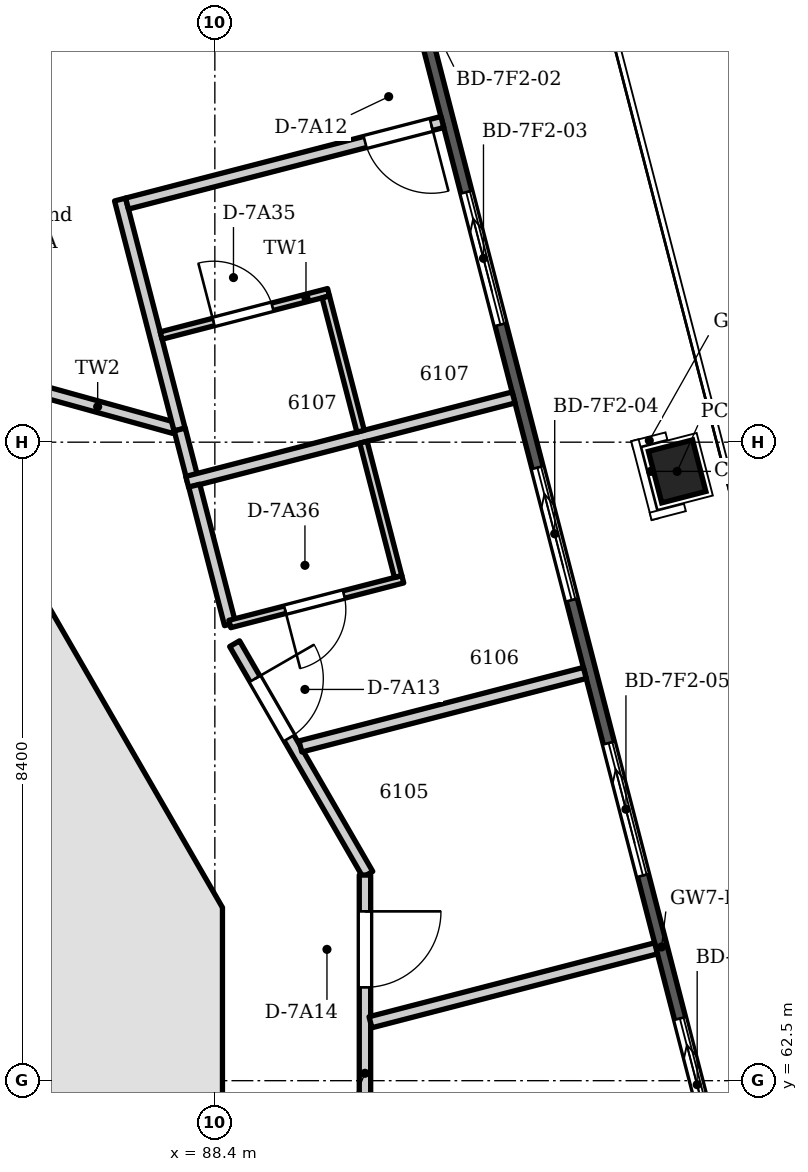
"""IFC4 building model, lengths in metres.
Left out: names, types, materials, properties, quantities, classifications, styles, units other than length and angle.
Written with IfcOpenShell. Run it as: python <this file> out.ifc"""

import sys

from ifc_helpers import new_model, si_unit, direction, frame, frame_2d, origin, origin_2d, place, context, subcontext, project, spatial, polyline, rectangle, outline, extrude, element, fill, save


model = new_model("IFC4")
c1 = context("Model", 3, precision=1e-05, world=origin(), true_north=direction((0.0, 1.0)))
c2 = subcontext(c1, "Body", "Model", "MODEL_VIEW")
j1 = project(units=[si_unit("LENGTHUNIT", "METRE"), si_unit("PLANEANGLEUNIT", "RADIAN")], contexts=[c1])
p1 = place(None, origin())
s1 = spatial("IfcSite", under=j1, at=p1, CompositionType="ELEMENT")
p2 = place(p1, origin())
s2 = spatial("IfcBuilding", under=s1, at=p2, CompositionType="ELEMENT")
p3 = place(p2, frame((0.0, 0.0, 234.9)))
s3 = spatial("IfcBuildingStorey", under=s2, at=p3, CompositionType="ELEMENT", Elevation=234.9)
p4 = place(p3, frame((88.15, 60.222, 0.0), z_axis=(0.0, 0.0, 1.0), x_axis=(0.0, 1.0, 0.0)))
e1 = element("IfcWall", 1, at=p4, inside=s3, PredefinedType="SHEAR", context=c2, shape_type="SweptSolid", body=[
    extrude(outline(polyline([(0.0, -0.35), (4.555, -0.35), (4.368, 0.35), (0.188, 0.35), (0.0, -0.35)])), origin(), (0.0, 0.0, 1.0), 3.6),
])
p5 = place(p4, frame((0.642, 0.0, 0.0)))
e2 = element("IfcOpeningElement", 2, at=p5, cuts=e1, PredefinedType="OPENING", context=c2, shape_type="SweptSolid", body=[
    extrude(rectangle(XDim=0.9, YDim=2.1, at=frame_2d((0.45, 1.05))), frame((0.0, 0.36, 0.0), z_axis=(0.0, -1.0, 0.0), x_axis=(1.0, 0.0, 0.0)), (0.0, 0.0, 1.0), 0.72),
])
p6 = place(p3, frame((88.197, 64.603, 0.0), z_axis=(0.0, 0.0, 1.0), x_axis=(-0.499983800959, 0.866034756103, 0.0)))
e3 = element("IfcWall", 3, at=p6, inside=s3, PredefinedType="SHEAR", context=c2, shape_type="SweptSolid", body=[
    extrude(outline(polyline([(0.0, -0.35), (4.555, -0.35), (4.368, 0.35), (0.188, 0.35), (0.0, -0.35)])), origin(), (0.0, 0.0, 1.0), 3.6),
])
p7 = place(p6, frame((1.677, 0.0, 0.0)))
e4 = element("IfcOpeningElement", 4, at=p7, cuts=e3, PredefinedType="OPENING", context=c2, shape_type="SweptSolid", body=[
    extrude(rectangle(XDim=1.2, YDim=2.1, at=frame_2d((0.6, 1.05))), frame((0.0, 0.36, 0.0), z_axis=(0.0, -1.0, 0.0), x_axis=(1.0, 0.0, 0.0)), (0.0, 0.0, 1.0), 0.72),
])
p8 = place(p3, frame((83.619, 63.031, 0.0), z_axis=(0.0, 0.0, 1.0), x_axis=(0.866059941101, 0.499940174841, 0.0)))
e5 = element("IfcWall", 5, at=p8, inside=s3, PredefinedType="SHEAR", context=c2, shape_type="SweptSolid", body=[
    extrude(rectangle(XDim=4.4, YDim=0.3, at=frame_2d((2.2, 0.0))), origin(), (0.0, 0.0, 1.0), 3.6),
])
p9 = place(p8, frame((1.4, 0.0, 0.0)))
e6 = element("IfcOpeningElement", 6, at=p9, cuts=e5, PredefinedType="OPENING", context=c2, shape_type="SweptSolid", body=[
    extrude(rectangle(XDim=0.9, YDim=2.1, at=frame_2d((0.45, 1.05))), frame((0.0, 0.16, 0.0), z_axis=(0.0, -1.0, 0.0), x_axis=(1.0, 0.0, 0.0)), (0.0, 0.0, 1.0), 0.32),
])
p10 = place(p3, frame((81.8, 63.28, 0.0), z_axis=(0.0, 0.0, 1.0), x_axis=(0.866009627307, -0.500027324665, 0.0)))
e7 = element("IfcWall", 7, at=p10, inside=s3, PredefinedType="SHEAR", context=c2, shape_type="SweptSolid", body=[
    extrude(rectangle(XDim=6.632, YDim=0.3, at=frame_2d((3.316, 0.0))), origin(), (0.0, 0.0, 1.0), 3.6),
])
p11 = place(p3, frame((94.482, 70.516, -0.35), z_axis=(0.0, 0.0, 1.0), x_axis=(-0.250380004054, 0.968147640378, 0.0)))
e8 = element("IfcColumn", 8, at=p11, inside=s3, PredefinedType="COLUMN", context=c2, shape_type="SweptSolid", body=[
    extrude(rectangle(XDim=0.7, YDim=0.6, at=origin_2d()), origin(), (0.0, 0.0, 1.0), 3.95),
])
p12 = place(p3, frame((89.591, 82.378, 0.0), z_axis=(0.0, 0.0, 1.0), x_axis=(0.250378839788, -0.968147941477, 0.0)))
e9 = element("IfcWall", 9, at=p12, inside=s3, PredefinedType="SOLIDWALL", context=c2, shape_type="SweptSolid", body=[
    extrude(outline(polyline([(0.149, 0.075), (0.149, -0.075), (33.537, -0.075), (33.537, 0.075), (0.149, 0.075)])), origin(), (0.0, 0.0, 1.0), 3.3),
])
p13 = place(p12, frame((1.171, 0.0, 0.0)))
e10 = element("IfcOpeningElement", 10, at=p13, cuts=e9, PredefinedType="OPENING", context=c2, shape_type="SweptSolid", body=[
    extrude(rectangle(XDim=1.8, YDim=2.6, at=frame_2d((0.9, 1.3))), frame((0.0, 0.085, 0.0), z_axis=(0.0, -1.0, 0.0), x_axis=(1.0, 0.0, 0.0)), (0.0, 0.0, 1.0), 0.17),
])
p14 = place(p12, frame((4.714, 0.0, 0.0)))
e11 = element("IfcOpeningElement", 11, at=p14, cuts=e9, PredefinedType="OPENING", context=c2, shape_type="SweptSolid", body=[
    extrude(rectangle(XDim=1.8, YDim=2.6, at=frame_2d((0.9, 1.3))), frame((0.0, 0.085, 0.0), z_axis=(0.0, -1.0, 0.0), x_axis=(1.0, 0.0, 0.0)), (0.0, 0.0, 1.0), 0.17),
])
p15 = place(p12, frame((8.457, 0.0, 0.0)))
e12 = element("IfcOpeningElement", 12, at=p15, cuts=e9, PredefinedType="OPENING", context=c2, shape_type="SweptSolid", body=[
    extrude(rectangle(XDim=1.8, YDim=2.6, at=frame_2d((0.9, 1.3))), frame((0.0, 0.085, 0.0), z_axis=(0.0, -1.0, 0.0), x_axis=(1.0, 0.0, 0.0)), (0.0, 0.0, 1.0), 0.17),
])
p16 = place(p12, frame((12.2, 0.0, 0.0)))
e13 = element("IfcOpeningElement", 13, at=p16, cuts=e9, PredefinedType="OPENING", context=c2, shape_type="SweptSolid", body=[
    extrude(rectangle(XDim=1.8, YDim=2.6, at=frame_2d((0.9, 1.3))), frame((0.0, 0.085, 0.0), z_axis=(0.0, -1.0, 0.0), x_axis=(1.0, 0.0, 0.0)), (0.0, 0.0, 1.0), 0.17),
])
p17 = place(p12, frame((15.943, 0.0, 0.0)))
e14 = element("IfcOpeningElement", 14, at=p17, cuts=e9, PredefinedType="OPENING", context=c2, shape_type="SweptSolid", body=[
    extrude(rectangle(XDim=1.8, YDim=2.6, at=frame_2d((0.9, 1.3))), frame((0.0, 0.085, 0.0), z_axis=(0.0, -1.0, 0.0), x_axis=(1.0, 0.0, 0.0)), (0.0, 0.0, 1.0), 0.17),
])
p18 = place(p12, frame((19.686, 0.0, 0.0)))
e15 = element("IfcOpeningElement", 15, at=p18, cuts=e9, PredefinedType="OPENING", context=c2, shape_type="SweptSolid", body=[
    extrude(rectangle(XDim=1.8, YDim=2.6, at=frame_2d((0.9, 1.3))), frame((0.0, 0.085, 0.0), z_axis=(0.0, -1.0, 0.0), x_axis=(1.0, 0.0, 0.0)), (0.0, 0.0, 1.0), 0.17),
])
p19 = place(p12, frame((23.429, 0.0, 0.0)))
e16 = element("IfcOpeningElement", 16, at=p19, cuts=e9, PredefinedType="OPENING", context=c2, shape_type="SweptSolid", body=[
    extrude(rectangle(XDim=1.8, YDim=2.6, at=frame_2d((0.9, 1.3))), frame((0.0, 0.085, 0.0), z_axis=(0.0, -1.0, 0.0), x_axis=(1.0, 0.0, 0.0)), (0.0, 0.0, 1.0), 0.17),
])
p20 = place(p12, frame((27.172, 0.0, 0.0)))
e17 = element("IfcOpeningElement", 17, at=p20, cuts=e9, PredefinedType="OPENING", context=c2, shape_type="SweptSolid", body=[
    extrude(rectangle(XDim=1.8, YDim=2.6, at=frame_2d((0.9, 1.3))), frame((0.0, 0.085, 0.0), z_axis=(0.0, -1.0, 0.0), x_axis=(1.0, 0.0, 0.0)), (0.0, 0.0, 1.0), 0.17),
])
p21 = place(p12, frame((30.715, 0.0, 0.0)))
e18 = element("IfcOpeningElement", 18, at=p21, cuts=e9, PredefinedType="OPENING", context=c2, shape_type="SweptSolid", body=[
    extrude(rectangle(XDim=1.8, YDim=2.6, at=frame_2d((0.9, 1.3))), frame((0.0, 0.085, 0.0), z_axis=(0.0, -1.0, 0.0), x_axis=(1.0, 0.0, 0.0)), (0.0, 0.0, 1.0), 0.17),
])
p22 = place(p3, origin())
e19 = element("IfcWall", 19, at=p22, inside=s3, PredefinedType="PARAPET", context=c2, shape_type="SweptSolid", body=[
    extrude(outline(polyline([(100.299, 50.419), (94.431, 89.683), (94.16, 89.468), (99.581, 53.198), (100.299, 50.419)])), origin(), (0.0, 0.0, 1.0), 1.1),
])
p23 = place(p3, frame((85.852, 71.646, 0.0), z_axis=(0.0, 0.0, 1.0), x_axis=(0.963638385721, -0.267209770713, 0.0)))
e20 = element("IfcWall", 20, at=p23, inside=s3, PredefinedType="PARTITIONING", context=c2, shape_type="SweptSolid", body=[
    extrude(rectangle(XDim=2.089, YDim=0.15, at=frame_2d((1.044, 0.0))), origin(), (0.0, 0.0, 1.0), 3.3),
])
p24 = place(p3, frame((87.153, 74.093, 0.0), z_axis=(0.0, 0.0, 1.0), x_axis=(0.250373987534, -0.968149196336, 0.0)))
e21 = element("IfcWall", 21, at=p24, inside=s3, PredefinedType="PARTITIONING", context=c2, shape_type="SweptSolid", body=[
    extrude(rectangle(XDim=3.126, YDim=0.15, at=frame_2d((1.563, 0.0))), origin(), (0.0, 0.0, 1.0), 3.3),
])
p25 = place(p3, frame((87.245, 74.039, 0.0), z_axis=(0.0, 0.0, 1.0), x_axis=(0.968129527106, 0.250450032434, 0.0)))
e22 = element("IfcWall", 22, at=p25, inside=s3, PredefinedType="PARTITIONING", context=c2, shape_type="SweptSolid", body=[
    extrude(rectangle(XDim=4.285, YDim=0.15, at=frame_2d((2.143, 0.0))), origin(), (0.0, 0.0, 1.0), 3.3),
])
p26 = place(p25, frame((3.235, 0.0, 0.0)))
e23 = element("IfcOpeningElement", 23, at=p26, cuts=e22, PredefinedType="OPENING", context=c2, shape_type="SweptSolid", body=[
    extrude(rectangle(XDim=0.9, YDim=2.1, at=frame_2d((0.45, 1.05))), frame((0.0, 0.085, 0.0), z_axis=(0.0, -1.0, 0.0), x_axis=(1.0, 0.0, 0.0)), (0.0, 0.0, 1.0), 0.17),
])
p27 = place(p3, frame((87.694, 72.303, 0.0), z_axis=(0.0, 0.0, 1.0), x_axis=(0.968107869502, 0.25053373627, 0.0)))
e24 = element("IfcWall", 24, at=p27, inside=s3, PredefinedType="PARTITIONING", context=c2, shape_type="SweptSolid", body=[
    extrude(rectangle(XDim=2.274, YDim=0.1, at=frame_2d((1.137, 0.0))), origin(), (0.0, 0.0, 1.0), 3.3),
])
p28 = place(p27, frame((0.712, 0.0, 0.0)))
e25 = element("IfcOpeningElement", 25, at=p28, cuts=e24, PredefinedType="OPENING", context=c2, shape_type="SweptSolid", body=[
    extrude(rectangle(XDim=0.8, YDim=2.1, at=frame_2d((0.4, 1.05))), frame((0.0, 0.06, 0.0), z_axis=(0.0, -1.0, 0.0), x_axis=(1.0, 0.0, 0.0)), (0.0, 0.0, 1.0), 0.12),
])
p29 = place(p3, frame((87.938, 71.067, 0.0), z_axis=(0.0, 0.0, 1.0), x_axis=(0.250122032582, -0.968214319672, 0.0)))
e26 = element("IfcWall", 26, at=p29, inside=s3, PredefinedType="PARTITIONING", context=c2, shape_type="SweptSolid", body=[
    extrude(rectangle(XDim=0.696, YDim=0.15, at=frame_2d((0.348, 0.0))), origin(), (0.0, 0.0, 1.0), 3.3),
])
p30 = place(p3, frame((88.036, 70.377, 0.0), z_axis=(0.0, 0.0, 1.0), x_axis=(0.968128504483, 0.25045398541, 0.0)))
e27 = element("IfcWall", 27, at=p30, inside=s3, PredefinedType="PARTITIONING", context=c2, shape_type="SweptSolid", body=[
    extrude(rectangle(XDim=4.435, YDim=0.15, at=frame_2d((2.218, 0.0))), origin(), (0.0, 0.0, 1.0), 3.3),
])
p31 = place(p3, frame((88.129, 70.328, 0.0), z_axis=(0.0, 0.0, 1.0), x_axis=(0.250183804331, -0.968198359868, 0.0)))
e28 = element("IfcWall", 28, at=p31, inside=s3, PredefinedType="PARTITIONING", context=c2, shape_type="SweptSolid", body=[
    extrude(rectangle(XDim=1.883, YDim=0.15, at=frame_2d((0.942, 0.0))), origin(), (0.0, 0.0, 1.0), 3.3),
])
p32 = place(p3, frame((88.597, 68.508, 0.0), z_axis=(0.0, 0.0, 1.0), x_axis=(0.968155594174, 0.250349246991, 0.0)))
e29 = element("IfcWall", 29, at=p32, inside=s3, PredefinedType="PARTITIONING", context=c2, shape_type="SweptSolid", body=[
    extrude(rectangle(XDim=2.35, YDim=0.1, at=frame_2d((1.175, 0.0))), origin(), (0.0, 0.0, 1.0), 3.3),
])
p33 = place(p32, frame((0.75, 0.0, 0.0)))
e30 = element("IfcOpeningElement", 30, at=p33, cuts=e29, PredefinedType="OPENING", context=c2, shape_type="SweptSolid", body=[
    extrude(rectangle(XDim=0.8, YDim=2.1, at=frame_2d((0.4, 1.05))), frame((0.0, 0.06, 0.0), z_axis=(0.0, -1.0, 0.0), x_axis=(1.0, 0.0, 0.0)), (0.0, 0.0, 1.0), 0.12),
])
p34 = place(p3, frame((88.66, 68.249, 0.0), z_axis=(0.0, 0.0, 1.0), x_axis=(0.500223035479, -0.865896595891, 0.0)))
e31 = element("IfcWall", 31, at=p34, inside=s3, PredefinedType="PARTITIONING", context=c2, shape_type="SweptSolid", body=[
    extrude(rectangle(XDim=3.504, YDim=0.15, at=frame_2d((1.752, 0.0))), origin(), (0.0, 0.0, 1.0), 3.3),
])
p35 = place(p34, frame((0.534, 0.0, 0.0)))
e32 = element("IfcOpeningElement", 32, at=p35, cuts=e31, PredefinedType="OPENING", context=c2, shape_type="SweptSolid", body=[
    extrude(rectangle(XDim=0.9, YDim=2.1, at=frame_2d((0.45, 1.05))), frame((0.0, 0.085, 0.0), z_axis=(0.0, -1.0, 0.0), x_axis=(1.0, 0.0, 0.0)), (0.0, 0.0, 1.0), 0.17),
])
p36 = place(p3, frame((89.526, 66.897, 0.0), z_axis=(0.0, 0.0, 1.0), x_axis=(0.968171724996, 0.250286857264, 0.0)))
e33 = element("IfcWall", 33, at=p36, inside=s3, PredefinedType="PARTITIONING", context=c2, shape_type="SweptSolid", body=[
    extrude(rectangle(XDim=3.865, YDim=0.15, at=frame_2d((1.932, 0.0))), origin(), (0.0, 0.0, 1.0), 3.3),
])
for number, where, z_axis, x_axis in (
    (34, (89.86, 72.812, 0.0), (0.0, 0.0, 1.0), (0.251, -0.968, 0.0)),
    (35, (90.355, 70.899, 0.0), (0.0, 0.0, 1.0), (0.25, -0.968, 0.0)),
):
    element("IfcWall", number, at=place(p3, frame(where, z_axis=z_axis, x_axis=x_axis)), inside=s3, PredefinedType="PARTITIONING", context=c2, shape_type="SweptSolid", body=[
        extrude(rectangle(XDim=1.825, YDim=0.1, at=frame_2d((0.913, 0.0))), origin(), (0.0, 0.0, 1.0), 3.3),
    ])
p37 = place(p3, frame((90.375, 61.617, 0.0), z_axis=(0.0, 0.0, 1.0), x_axis=(0.0, 1.0, 0.0)))
e36 = element("IfcWall", 36, at=p37, inside=s3, PredefinedType="PARTITIONING", context=c2, shape_type="SweptSolid", body=[
    extrude(rectangle(XDim=3.588, YDim=0.15, at=frame_2d((1.794, 0.0))), origin(), (0.0, 0.0, 1.0), 3.3),
])
p38 = place(p37, frame((2.111, 0.0, 0.0)))
e37 = element("IfcOpeningElement", 37, at=p38, cuts=e36, PredefinedType="OPENING", context=c2, shape_type="SweptSolid", body=[
    extrude(rectangle(XDim=1.0, YDim=2.1, at=frame_2d((0.5, 1.05))), frame((0.0, 0.085, 0.0), z_axis=(0.0, -1.0, 0.0), x_axis=(1.0, 0.0, 0.0)), (0.0, 0.0, 1.0), 0.17),
])
p39 = place(p3, frame((90.448, 63.269, 0.0), z_axis=(0.0, 0.0, 1.0), x_axis=(0.968111141553, 0.250521092128, 0.0)))
e38 = element("IfcWall", 38, at=p39, inside=s3, PredefinedType="PARTITIONING", context=c2, shape_type="SweptSolid", body=[
    extrude(rectangle(XDim=3.881, YDim=0.15, at=frame_2d((1.94, 0.0))), origin(), (0.0, 0.0, 1.0), 3.3),
])
p40 = place(p3, frame((85.006, 62.33, 0.0), z_axis=(0.0, 0.0, 1.0), x_axis=(0.866010750942, 0.50002537861, 0.0)))
e39 = element("IfcWall", 39, at=p40, inside=s3, PredefinedType="PARTITIONING", context=c2, shape_type="SweptSolid", body=[
    extrude(rectangle(XDim=2.0, YDim=0.15, at=frame_2d((1.0, 0.0))), origin(), (0.0, 0.0, 1.0), 3.3),
])
p41 = place(p40, frame((0.55, 0.0, 0.0)))
e40 = element("IfcOpeningElement", 40, at=p41, cuts=e39, PredefinedType="OPENING", context=c2, shape_type="SweptSolid", body=[
    extrude(rectangle(XDim=0.9, YDim=2.1, at=frame_2d((0.45, 1.05))), frame((0.0, 0.085, 0.0), z_axis=(0.0, -1.0, 0.0), x_axis=(1.0, 0.0, 0.0)), (0.0, 0.0, 1.0), 0.17),
])
p42 = place(p3, frame((85.675, 61.274, 0.0), z_axis=(0.0, 0.0, 1.0), x_axis=(0.866102336459, 0.499866725018, 0.0)))
e41 = element("IfcWall", 41, at=p42, inside=s3, PredefinedType="PARTITIONING", context=c2, shape_type="SweptSolid", body=[
    extrude(rectangle(XDim=2.148, YDim=0.2, at=frame_2d((1.074, 0.0))), origin(), (0.0, 0.0, 1.0), 3.3),
])
p43 = place(p3, frame((86.249, 64.376, 0.0), z_axis=(0.0, 0.0, 1.0), x_axis=(0.500136062276, -0.86594683394, 0.0)))
e42 = element("IfcWall", 42, at=p43, inside=s3, PredefinedType="PARTITIONING", context=c2, shape_type="SweptSolid", body=[
    extrude(rectangle(XDim=2.299, YDim=0.2, at=frame_2d((1.149, 0.0))), origin(), (0.0, 0.0, 1.0), 3.3),
])
p44 = place(p15, origin())
e43 = element("IfcDoor", 43, at=p44, inside=s3, OperationType="SLIDING_TO_LEFT", PredefinedType="DOOR", context=c2, shape_type="SweptSolid", body=[
    extrude(rectangle(XDim=1.8, YDim=2.6, at=frame_2d((0.9, 1.3))), frame((0.0, 0.025, 0.0), z_axis=(0.0, -1.0, 0.0), x_axis=(1.0, 0.0, 0.0)), (0.0, 0.0, 1.0), 0.05),
])
fill(e12, e43)
p45 = place(p16, origin())
e44 = element("IfcDoor", 44, at=p45, inside=s3, OperationType="SLIDING_TO_LEFT", PredefinedType="DOOR", context=c2, shape_type="SweptSolid", body=[
    extrude(rectangle(XDim=1.8, YDim=2.6, at=frame_2d((0.9, 1.3))), frame((0.0, 0.025, 0.0), z_axis=(0.0, -1.0, 0.0), x_axis=(1.0, 0.0, 0.0)), (0.0, 0.0, 1.0), 0.05),
])
fill(e13, e44)
p46 = place(p17, origin())
e45 = element("IfcDoor", 45, at=p46, inside=s3, OperationType="SLIDING_TO_LEFT", PredefinedType="DOOR", context=c2, shape_type="SweptSolid", body=[
    extrude(rectangle(XDim=1.8, YDim=2.6, at=frame_2d((0.9, 1.3))), frame((0.0, 0.025, 0.0), z_axis=(0.0, -1.0, 0.0), x_axis=(1.0, 0.0, 0.0)), (0.0, 0.0, 1.0), 0.05),
])
fill(e14, e45)
p47 = place(p18, origin())
e46 = element("IfcDoor", 46, at=p47, inside=s3, OperationType="SLIDING_TO_LEFT", PredefinedType="DOOR", context=c2, shape_type="SweptSolid", body=[
    extrude(rectangle(XDim=1.8, YDim=2.6, at=frame_2d((0.9, 1.3))), frame((0.0, 0.025, 0.0), z_axis=(0.0, -1.0, 0.0), x_axis=(1.0, 0.0, 0.0)), (0.0, 0.0, 1.0), 0.05),
])
fill(e15, e46)
p48 = place(p26, frame((0.9, 0.0, 0.0), z_axis=(0.0, 0.0, 1.0), x_axis=(-1.0, 0.0, 0.0)))
e47 = element("IfcDoor", 47, at=p48, inside=s3, OperationType="SINGLE_SWING_LEFT", PredefinedType="DOOR", context=c2, shape_type="SweptSolid", body=[
    extrude(rectangle(XDim=0.9, YDim=2.1, at=frame_2d((0.45, 1.05))), frame((0.0, 0.025, 0.0), z_axis=(0.0, -1.0, 0.0), x_axis=(1.0, 0.0, 0.0)), (0.0, 0.0, 1.0), 0.05),
])
fill(e23, e47)
p49 = place(p35, origin())
e48 = element("IfcDoor", 48, at=p49, inside=s3, OperationType="SINGLE_SWING_LEFT", PredefinedType="DOOR", context=c2, shape_type="SweptSolid", body=[
    extrude(rectangle(XDim=0.9, YDim=2.1, at=frame_2d((0.45, 1.05))), frame((0.0, 0.025, 0.0), z_axis=(0.0, -1.0, 0.0), x_axis=(1.0, 0.0, 0.0)), (0.0, 0.0, 1.0), 0.05),
])
fill(e32, e48)
p50 = place(p38, frame((1.0, 0.0, 0.0), z_axis=(0.0, 0.0, 1.0), x_axis=(-1.0, 0.0, 0.0)))
e49 = element("IfcDoor", 49, at=p50, inside=s3, OperationType="SINGLE_SWING_LEFT", PredefinedType="DOOR", context=c2, shape_type="SweptSolid", body=[
    extrude(rectangle(XDim=1.0, YDim=2.1, at=frame_2d((0.5, 1.05))), frame((0.0, 0.025, 0.0), z_axis=(0.0, -1.0, 0.0), x_axis=(1.0, 0.0, 0.0)), (0.0, 0.0, 1.0), 0.05),
])
fill(e37, e49)
p51 = place(p28, origin())
e50 = element("IfcDoor", 50, at=p51, inside=s3, OperationType="SINGLE_SWING_LEFT", PredefinedType="DOOR", context=c2, shape_type="SweptSolid", body=[
    extrude(rectangle(XDim=0.8, YDim=2.1, at=frame_2d((0.4, 1.05))), frame((0.0, 0.025, 0.0), z_axis=(0.0, -1.0, 0.0), x_axis=(1.0, 0.0, 0.0)), (0.0, 0.0, 1.0), 0.05),
])
fill(e25, e50)
p52 = place(p33, frame((0.8, 0.0, 0.0), z_axis=(0.0, 0.0, 1.0), x_axis=(-1.0, 0.0, 0.0)))
e51 = element("IfcDoor", 51, at=p52, inside=s3, OperationType="SINGLE_SWING_RIGHT", PredefinedType="DOOR", context=c2, shape_type="SweptSolid", body=[
    extrude(rectangle(XDim=0.8, YDim=2.1, at=frame_2d((0.4, 1.05))), frame((0.0, 0.025, 0.0), z_axis=(0.0, -1.0, 0.0), x_axis=(1.0, 0.0, 0.0)), (0.0, 0.0, 1.0), 0.05),
])
fill(e30, e51)
p53 = place(p7, origin())
e52 = element("IfcDoor", 52, at=p53, inside=s3, OperationType="DOUBLE_DOOR_SINGLE_SWING", PredefinedType="DOOR", context=c2, shape_type="SweptSolid", body=[
    extrude(rectangle(XDim=1.2, YDim=2.1, at=frame_2d((0.6, 1.05))), frame((0.0, 0.025, 0.0), z_axis=(0.0, -1.0, 0.0), x_axis=(1.0, 0.0, 0.0)), (0.0, 0.0, 1.0), 0.05),
])
fill(e4, e52)
p54 = place(p41, frame((0.9, 0.0, 0.0), z_axis=(0.0, 0.0, 1.0), x_axis=(-1.0, 0.0, 0.0)))
e53 = element("IfcDoor", 53, at=p54, inside=s3, OperationType="SINGLE_SWING_LEFT", PredefinedType="DOOR", context=c2, shape_type="SweptSolid", body=[
    extrude(rectangle(XDim=0.9, YDim=2.1, at=frame_2d((0.45, 1.05))), frame((0.0, 0.025, 0.0), z_axis=(0.0, -1.0, 0.0), x_axis=(1.0, 0.0, 0.0)), (0.0, 0.0, 1.0), 0.05),
])
fill(e40, e53)
save(model, sys.argv[1])
